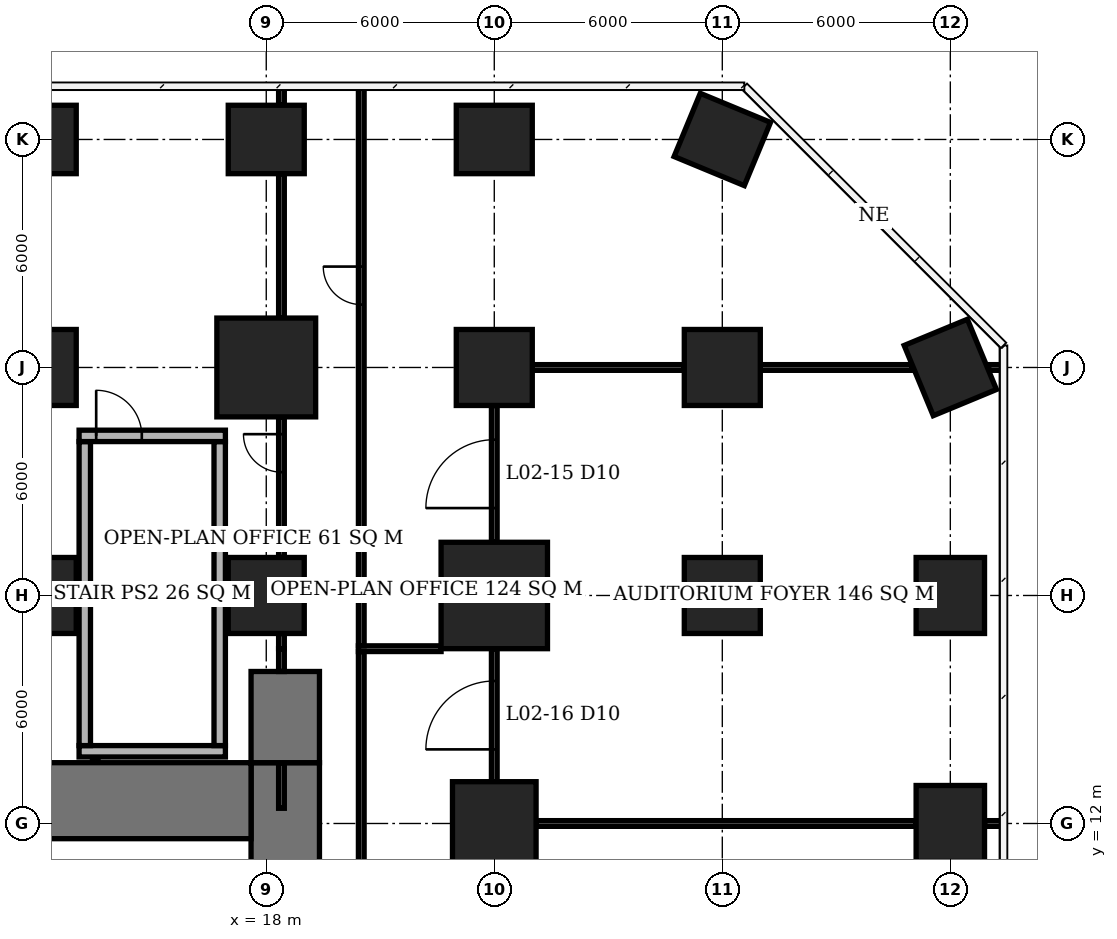
"""IFC4 building model, lengths in metres.
Left out: names, types, materials, properties, quantities, classifications, styles, units other than length and angle.
Written with IfcOpenShell. Run it as: python <this file> out.ifc"""

import sys

from ifc_helpers import new_model, si_unit, direction, frame, frame_2d, origin, origin_2d, place, context, subcontext, project, spatial, rectangle, extrude, element, fill, save


model = new_model("IFC4")
c1 = context("Model", 3, precision=1e-05, world=origin(), true_north=direction((0.0, 1.0)))
c2 = subcontext(c1, "Body", "Model", "MODEL_VIEW")
j1 = project(units=[si_unit("LENGTHUNIT", "METRE"), si_unit("PLANEANGLEUNIT", "RADIAN")], contexts=[c1])
p1 = place(None, origin())
s1 = spatial("IfcSite", under=j1, at=p1, CompositionType="ELEMENT")
p2 = place(p1, origin())
s2 = spatial("IfcBuilding", under=s1, at=p2, CompositionType="ELEMENT")
p3 = place(p2, frame((0.0, 0.0, 11.0)))
s3 = spatial("IfcBuildingStorey", under=s2, at=p3, CompositionType="ELEMENT", Elevation=11.0)
for number, where, z_axis, x_axis in (
    (1, (12.0, 18.0, 0.0), (0.0, 0.0, 1.0), (1.0, 0.0, 0.0)),
    (2, (12.0, 24.0, 0.0), (0.0, 0.0, 1.0), (1.0, 0.0, 0.0)),
):
    element("IfcColumn", number, at=place(p3, frame(where, z_axis=z_axis, x_axis=x_axis)), inside=s3, PredefinedType="COLUMN", context=c2, shape_type="SweptSolid", body=[
        extrude(rectangle(XDim=2.0, YDim=2.0, at=origin_2d()), origin(), (0.0, 0.0, 1.0), 7.2),
    ])
p4 = place(p3, frame((12.0, 30.0, 0.0), z_axis=(0.0, 0.0, 1.0), x_axis=(1.0, 0.0, 0.0)))
e3 = element("IfcColumn", 3, at=p4, inside=s3, PredefinedType="COLUMN", context=c2, shape_type="SweptSolid", body=[
    extrude(rectangle(XDim=2.0, YDim=1.8, at=origin_2d()), origin(), (0.0, 0.0, 1.0), 7.2),
])
p5 = place(p3, frame((18.0, 18.0, 0.0), z_axis=(0.0, 0.0, 1.0), x_axis=(1.0, 0.0, 0.0)))
e4 = element("IfcColumn", 4, at=p5, inside=s3, PredefinedType="COLUMN", context=c2, shape_type="SweptSolid", body=[
    extrude(rectangle(XDim=2.0, YDim=2.0, at=origin_2d()), origin(), (0.0, 0.0, 1.0), 7.2),
])
p6 = place(p3, frame((18.0, 24.0, 0.0), z_axis=(0.0, 0.0, 1.0), x_axis=(1.0, 0.0, 0.0)))
e5 = element("IfcColumn", 5, at=p6, inside=s3, PredefinedType="COLUMN", context=c2, shape_type="SweptSolid", body=[
    extrude(rectangle(XDim=2.6, YDim=2.6, at=origin_2d()), origin(), (0.0, 0.0, 1.0), 7.2),
])
p7 = place(p3, frame((18.0, 30.0, 0.0), z_axis=(0.0, 0.0, 1.0), x_axis=(1.0, 0.0, 0.0)))
e6 = element("IfcColumn", 6, at=p7, inside=s3, PredefinedType="COLUMN", context=c2, shape_type="SweptSolid", body=[
    extrude(rectangle(XDim=2.0, YDim=1.8, at=origin_2d()), origin(), (0.0, 0.0, 1.0), 7.2),
])
p8 = place(p3, frame((24.0, 12.0, 0.0), z_axis=(0.0, 0.0, 1.0), x_axis=(1.0, 0.0, 0.0)))
e7 = element("IfcColumn", 7, at=p8, inside=s3, PredefinedType="COLUMN", context=c2, shape_type="SweptSolid", body=[
    extrude(rectangle(XDim=2.2, YDim=2.2, at=origin_2d()), origin(), (0.0, 0.0, 1.0), 7.2),
])
p9 = place(p3, frame((24.0, 18.0, 0.0), z_axis=(0.0, 0.0, 1.0), x_axis=(1.0, 0.0, 0.0)))
e8 = element("IfcColumn", 8, at=p9, inside=s3, PredefinedType="COLUMN", context=c2, shape_type="SweptSolid", body=[
    extrude(rectangle(XDim=2.8, YDim=2.8, at=origin_2d()), origin(), (0.0, 0.0, 1.0), 7.2),
])
p10 = place(p3, frame((24.0, 24.0, 0.0), z_axis=(0.0, 0.0, 1.0), x_axis=(1.0, 0.0, 0.0)))
e9 = element("IfcColumn", 9, at=p10, inside=s3, PredefinedType="COLUMN", context=c2, shape_type="SweptSolid", body=[
    extrude(rectangle(XDim=2.0, YDim=2.0, at=origin_2d()), origin(), (0.0, 0.0, 1.0), 7.2),
])
p11 = place(p3, frame((24.0, 30.0, 0.0), z_axis=(0.0, 0.0, 1.0), x_axis=(1.0, 0.0, 0.0)))
e10 = element("IfcColumn", 10, at=p11, inside=s3, PredefinedType="COLUMN", context=c2, shape_type="SweptSolid", body=[
    extrude(rectangle(XDim=2.0, YDim=1.8, at=origin_2d()), origin(), (0.0, 0.0, 1.0), 7.2),
])
for number, where, z_axis, x_axis in (
    (11, (30.0, 18.0, 0.0), (0.0, 0.0, 1.0), (1.0, 0.0, 0.0)),
    (12, (30.0, 24.0, 0.0), (0.0, 0.0, 1.0), (1.0, 0.0, 0.0)),
):
    element("IfcColumn", number, at=place(p3, frame(where, z_axis=z_axis, x_axis=x_axis)), inside=s3, PredefinedType="COLUMN", context=c2, shape_type="SweptSolid", body=[
        extrude(rectangle(XDim=2.0, YDim=2.0, at=origin_2d()), origin(), (0.0, 0.0, 1.0), 7.2),
    ])
for number, where, z_axis, x_axis in (
    (13, (30.0, 30.0, 0.0), (0.0, 0.0, 1.0), (0.924, -0.383, 0.0)),
    (14, (36.0, 12.0, 0.0), (0.0, 0.0, 1.0), (0.0, 1.0, 0.0)),
    (15, (36.0, 18.0, 0.0), (0.0, 0.0, 1.0), (0.0, 1.0, 0.0)),
    (16, (36.0, 24.0, 0.0), (0.0, 0.0, 1.0), (0.383, -0.924, 0.0)),
):
    element("IfcColumn", number, at=place(p3, frame(where, z_axis=z_axis, x_axis=x_axis)), inside=s3, PredefinedType="COLUMN", context=c2, shape_type="SweptSolid", body=[
        extrude(rectangle(XDim=2.0, YDim=1.8, at=origin_2d()), origin(), (0.0, 0.0, 1.0), 7.2),
    ])
p12 = place(p3, frame((-5.6, 12.6, 0.0), z_axis=(0.0, 0.0, 1.0), x_axis=(1.0, 0.0, 0.0)))
e17 = element("IfcWall", 17, at=p12, inside=s3, PredefinedType="SHEAR", context=c2, shape_type="SweptSolid", body=[
    extrude(rectangle(XDim=23.2, YDim=2.0, at=frame_2d((11.6, 0.0))), origin(), (0.0, 0.0, 1.0), 7.2),
])
p13 = place(p3, frame((18.5, -7.6, 0.0), z_axis=(0.0, 0.0, 1.0), x_axis=(0.0, 1.0, 0.0)))
e18 = element("IfcWall", 18, at=p13, inside=s3, PredefinedType="SHEAR", context=c2, shape_type="SweptSolid", body=[
    extrude(rectangle(XDim=21.2, YDim=1.8, at=frame_2d((10.6, 0.0))), origin(), (0.0, 0.0, 1.0), 7.2),
])
p14 = place(p13, frame((9.2, 0.0, 0.0)))
e19 = element("IfcOpeningElement", 19, at=p14, cuts=e18, PredefinedType="OPENING", context=c2, shape_type="SweptSolid", body=[
    extrude(rectangle(XDim=1.8, YDim=2.4, at=frame_2d((0.9, 1.2))), frame((0.0, 0.91, 0.0), z_axis=(0.0, -1.0, 0.0), x_axis=(1.0, 0.0, 0.0)), (0.0, 0.0, 1.0), 1.82),
])
p15 = place(p3, frame((18.5, 13.6, 0.0), z_axis=(0.0, 0.0, 1.0), x_axis=(0.0, 1.0, 0.0)))
e20 = element("IfcWall", 20, at=p15, inside=s3, PredefinedType="SHEAR", context=c2, shape_type="SweptSolid", body=[
    extrude(rectangle(XDim=2.4, YDim=1.8, at=frame_2d((1.2, 0.0))), origin(), (0.0, 0.0, 1.0), 7.2),
])
p16 = place(p3, frame((13.075, 13.9, 0.0), z_axis=(0.0, 0.0, 1.0), x_axis=(1.0, 0.0, 0.0)))
e21 = element("IfcWall", 21, at=p16, inside=s3, PredefinedType="PARTITIONING", context=c2, shape_type="SweptSolid", body=[
    extrude(rectangle(XDim=3.85, YDim=0.3, at=frame_2d((1.925, 0.0))), origin(), (0.0, 0.0, 1.0), 6.95),
])
p17 = place(p3, frame((13.075, 22.2, 0.0), z_axis=(0.0, 0.0, 1.0), x_axis=(1.0, 0.0, 0.0)))
e22 = element("IfcWall", 22, at=p17, inside=s3, PredefinedType="PARTITIONING", context=c2, shape_type="SweptSolid", body=[
    extrude(rectangle(XDim=3.85, YDim=0.3, at=frame_2d((1.925, 0.0))), origin(), (0.0, 0.0, 1.0), 6.95),
])
p18 = place(p17, frame((0.45, 0.0, 0.0)))
e23 = element("IfcOpeningElement", 23, at=p18, cuts=e22, PredefinedType="OPENING", context=c2, shape_type="SweptSolid", body=[
    extrude(rectangle(XDim=1.2, YDim=2.1, at=frame_2d((0.6, 1.05))), frame((0.0, 0.16, 0.0), z_axis=(0.0, -1.0, 0.0), x_axis=(1.0, 0.0, 0.0)), (0.0, 0.0, 1.0), 0.32),
])
for number, where, z_axis, x_axis in (
    (24, (13.225, 14.05, 0.0), (0.0, 0.0, 1.0), (0.0, 1.0, 0.0)),
    (25, (16.775, 14.05, 0.0), (0.0, 0.0, 1.0), (0.0, 1.0, 0.0)),
):
    element("IfcWall", number, at=place(p3, frame(where, z_axis=z_axis, x_axis=x_axis)), inside=s3, PredefinedType="PARTITIONING", context=c2, shape_type="SweptSolid", body=[
        extrude(rectangle(XDim=8.0, YDim=0.3, at=frame_2d((4.0, 0.0))), origin(), (0.0, 0.0, 1.0), 6.95),
    ])
p19 = place(p3, frame((25.1, 12.0, 0.0), z_axis=(0.0, 0.0, 1.0), x_axis=(1.0, 0.0, 0.0)))
e26 = element("IfcWall", 26, at=p19, inside=s3, PredefinedType="PARTITIONING", context=c2, shape_type="SweptSolid", body=[
    extrude(rectangle(XDim=10.0, YDim=0.15, at=frame_2d((5.0, 0.0))), origin(), (0.0, 0.0, 1.0), 6.8),
])
p20 = place(p3, frame((36.9, 12.0, 0.0), z_axis=(0.0, 0.0, 1.0), x_axis=(1.0, 0.0, 0.0)))
e27 = element("IfcWall", 27, at=p20, inside=s3, PredefinedType="PARTITIONING", context=c2, shape_type="SweptSolid", body=[
    extrude(rectangle(XDim=0.475, YDim=0.15, at=frame_2d((0.238, 0.0))), origin(), (0.0, 0.0, 1.0), 6.8),
])
p21 = place(p3, frame((25.0, 24.0, 0.0), z_axis=(0.0, 0.0, 1.0), x_axis=(1.0, 0.0, 0.0)))
e28 = element("IfcWall", 28, at=p21, inside=s3, PredefinedType="PARTITIONING", context=c2, shape_type="SweptSolid", body=[
    extrude(rectangle(XDim=4.0, YDim=0.15, at=frame_2d((2.0, 0.0))), origin(), (0.0, 0.0, 1.0), 6.8),
])
p22 = place(p3, frame((31.0, 24.0, 0.0), z_axis=(0.0, 0.0, 1.0), x_axis=(1.0, 0.0, 0.0)))
e29 = element("IfcWall", 29, at=p22, inside=s3, PredefinedType="PARTITIONING", context=c2, shape_type="SweptSolid", body=[
    extrude(rectangle(XDim=3.995, YDim=0.15, at=frame_2d((1.998, 0.0))), origin(), (0.0, 0.0, 1.0), 6.8),
])
p23 = place(p3, frame((37.005, 24.0, 0.0), z_axis=(0.0, 0.0, 1.0), x_axis=(1.0, 0.0, 0.0)))
e30 = element("IfcWall", 30, at=p23, inside=s3, PredefinedType="PARTITIONING", context=c2, shape_type="SweptSolid", body=[
    extrude(rectangle(XDim=0.37, YDim=0.15, at=frame_2d((0.185, 0.0))), origin(), (0.0, 0.0, 1.0), 6.8),
])
p24 = place(p3, frame((24.0, 13.1, 0.0), z_axis=(0.0, 0.0, 1.0), x_axis=(0.0, 1.0, 0.0)))
e31 = element("IfcWall", 31, at=p24, inside=s3, PredefinedType="PARTITIONING", context=c2, shape_type="SweptSolid", body=[
    extrude(rectangle(XDim=3.5, YDim=0.15, at=frame_2d((1.75, 0.0))), origin(), (0.0, 0.0, 1.0), 6.8),
])
p25 = place(p24, frame((0.85, 0.0, 0.0)))
e32 = element("IfcOpeningElement", 32, at=p25, cuts=e31, PredefinedType="OPENING", context=c2, shape_type="SweptSolid", body=[
    extrude(rectangle(XDim=1.8, YDim=2.4, at=frame_2d((0.9, 1.2))), frame((0.0, 0.085, 0.0), z_axis=(0.0, -1.0, 0.0), x_axis=(1.0, 0.0, 0.0)), (0.0, 0.0, 1.0), 0.17),
])
p26 = place(p3, frame((24.0, 19.4, 0.0), z_axis=(0.0, 0.0, 1.0), x_axis=(0.0, 1.0, 0.0)))
e33 = element("IfcWall", 33, at=p26, inside=s3, PredefinedType="PARTITIONING", context=c2, shape_type="SweptSolid", body=[
    extrude(rectangle(XDim=3.6, YDim=0.15, at=frame_2d((1.8, 0.0))), origin(), (0.0, 0.0, 1.0), 6.8),
])
p27 = place(p26, frame((0.9, 0.0, 0.0)))
e34 = element("IfcOpeningElement", 34, at=p27, cuts=e33, PredefinedType="OPENING", context=c2, shape_type="SweptSolid", body=[
    extrude(rectangle(XDim=1.8, YDim=2.4, at=frame_2d((0.9, 1.2))), frame((0.0, 0.085, 0.0), z_axis=(0.0, -1.0, 0.0), x_axis=(1.0, 0.0, 0.0)), (0.0, 0.0, 1.0), 0.17),
])
p28 = place(p3, frame((13.5, 12.4, 0.0), z_axis=(0.0, 0.0, 1.0), x_axis=(0.0, 1.0, 0.0)))
e35 = element("IfcWall", 35, at=p28, inside=s3, PredefinedType="PARTITIONING", context=c2, shape_type="SweptSolid", body=[
    extrude(rectangle(XDim=1.35, YDim=0.15, at=frame_2d((0.675, 0.0))), origin(), (0.0, 0.0, 1.0), 6.95),
])
p29 = place(p3, frame((18.4, 12.4, 0.0), z_axis=(0.0, 0.0, 1.0), x_axis=(0.0, 1.0, 0.0)))
e36 = element("IfcWall", 36, at=p29, inside=s3, PredefinedType="PARTITIONING", context=c2, shape_type="SweptSolid", body=[
    extrude(rectangle(XDim=1.2, YDim=0.15, at=frame_2d((0.6, 0.0))), origin(), (0.0, 0.0, 1.0), 6.95),
])
p30 = place(p3, frame((18.4, 16.0, 0.0), z_axis=(0.0, 0.0, 1.0), x_axis=(0.0, 1.0, 0.0)))
e37 = element("IfcWall", 37, at=p30, inside=s3, PredefinedType="PARTITIONING", context=c2, shape_type="SweptSolid", body=[
    extrude(rectangle(XDim=0.6, YDim=0.15, at=frame_2d((0.3, 0.0))), origin(), (0.0, 0.0, 1.0), 6.95),
])
p31 = place(p3, frame((18.4, 16.6, 0.0), z_axis=(0.0, 0.0, 1.0), x_axis=(0.0, 1.0, 0.0)))
e38 = element("IfcWall", 38, at=p31, inside=s3, PredefinedType="PARTITIONING", context=c2, shape_type="SweptSolid", body=[
    extrude(rectangle(XDim=0.4, YDim=0.15, at=frame_2d((0.2, 0.0))), origin(), (0.0, 0.0, 1.0), 6.95),
])
p32 = place(p3, frame((18.4, 19.0, 0.0), z_axis=(0.0, 0.0, 1.0), x_axis=(0.0, 1.0, 0.0)))
e39 = element("IfcWall", 39, at=p32, inside=s3, PredefinedType="PARTITIONING", context=c2, shape_type="SweptSolid", body=[
    extrude(rectangle(XDim=3.7, YDim=0.15, at=frame_2d((1.85, 0.0))), origin(), (0.0, 0.0, 1.0), 6.95),
])
p33 = place(p32, frame((2.245, 0.0, 0.0)))
e40 = element("IfcOpeningElement", 40, at=p33, cuts=e39, PredefinedType="OPENING", context=c2, shape_type="SweptSolid", body=[
    extrude(rectangle(XDim=1.0, YDim=2.1, at=frame_2d((0.5, 1.05))), frame((0.0, 0.085, 0.0), z_axis=(0.0, -1.0, 0.0), x_axis=(1.0, 0.0, 0.0)), (0.0, 0.0, 1.0), 0.17),
])
p34 = place(p3, frame((18.4, 25.3, 0.0), z_axis=(0.0, 0.0, 1.0), x_axis=(0.0, 1.0, 0.0)))
e41 = element("IfcWall", 41, at=p34, inside=s3, PredefinedType="PARTITIONING", context=c2, shape_type="SweptSolid", body=[
    extrude(rectangle(XDim=3.8, YDim=0.15, at=frame_2d((1.9, 0.0))), origin(), (0.0, 0.0, 1.0), 6.95),
])
p35 = place(p3, frame((18.4, 30.9, 0.0), z_axis=(0.0, 0.0, 1.0), x_axis=(0.0, 1.0, 0.0)))
e42 = element("IfcWall", 42, at=p35, inside=s3, PredefinedType="PARTITIONING", context=c2, shape_type="SweptSolid", body=[
    extrude(rectangle(XDim=0.45, YDim=0.15, at=frame_2d((0.225, 0.0))), origin(), (0.0, 0.0, 1.0), 6.95),
])
p36 = place(p3, frame((20.5, 1.575, 0.0), z_axis=(0.0, 0.0, 1.0), x_axis=(0.0, 1.0, 0.0)))
e43 = element("IfcWall", 43, at=p36, inside=s3, PredefinedType="PARTITIONING", context=c2, shape_type="SweptSolid", body=[
    extrude(rectangle(XDim=14.95, YDim=0.15, at=frame_2d((7.475, 0.0))), origin(), (0.0, 0.0, 1.0), 6.95),
])
p37 = place(p36, frame((7.875, 0.0, 0.0)))
e44 = element("IfcOpeningElement", 44, at=p37, cuts=e43, PredefinedType="OPENING", context=c2, shape_type="SweptSolid", body=[
    extrude(rectangle(XDim=1.0, YDim=2.1, at=frame_2d((0.5, 1.05))), frame((0.0, 0.085, 0.0), z_axis=(0.0, -1.0, 0.0), x_axis=(1.0, 0.0, 0.0)), (0.0, 0.0, 1.0), 0.17),
])
p38 = place(p3, frame((20.5, 16.675, 0.0), z_axis=(0.0, 0.0, 1.0), x_axis=(0.0, 1.0, 0.0)))
e45 = element("IfcWall", 45, at=p38, inside=s3, PredefinedType="PARTITIONING", context=c2, shape_type="SweptSolid", body=[
    extrude(rectangle(XDim=14.7, YDim=0.15, at=frame_2d((7.35, 0.0))), origin(), (0.0, 0.0, 1.0), 6.95),
])
p39 = place(p38, frame((8.98, 0.0, 0.0)))
e46 = element("IfcOpeningElement", 46, at=p39, cuts=e45, PredefinedType="OPENING", context=c2, shape_type="SweptSolid", body=[
    extrude(rectangle(XDim=1.0, YDim=2.1, at=frame_2d((0.5, 1.05))), frame((0.0, 0.085, 0.0), z_axis=(0.0, -1.0, 0.0), x_axis=(1.0, 0.0, 0.0)), (0.0, 0.0, 1.0), 0.17),
])
p40 = place(p3, frame((20.425, 16.6, 0.0), z_axis=(0.0, 0.0, 1.0), x_axis=(1.0, 0.0, 0.0)))
e47 = element("IfcWall", 47, at=p40, inside=s3, PredefinedType="PARTITIONING", context=c2, shape_type="SweptSolid", body=[
    extrude(rectangle(XDim=2.175, YDim=0.15, at=frame_2d((1.087, 0.0))), origin(), (0.0, 0.0, 1.0), 6.95),
])
p41 = place(p18, origin())
e48 = element("IfcDoor", 48, at=p41, inside=s3, OperationType="SINGLE_SWING_LEFT", PredefinedType="DOOR", context=c2, shape_type="SweptSolid", body=[
    extrude(rectangle(XDim=1.2, YDim=2.1, at=frame_2d((0.6, 1.05))), frame((0.0, 0.025, 0.0), z_axis=(0.0, -1.0, 0.0), x_axis=(1.0, 0.0, 0.0)), (0.0, 0.0, 1.0), 0.05),
])
fill(e23, e48)
p42 = place(p27, origin())
e49 = element("IfcDoor", 49, at=p42, inside=s3, OperationType="DOUBLE_DOOR_SINGLE_SWING", PredefinedType="DOOR", context=c2, shape_type="SweptSolid", body=[
    extrude(rectangle(XDim=1.8, YDim=2.4, at=frame_2d((0.9, 1.2))), frame((0.0, 0.025, 0.0), z_axis=(0.0, -1.0, 0.0), x_axis=(1.0, 0.0, 0.0)), (0.0, 0.0, 1.0), 0.05),
])
fill(e34, e49)
p43 = place(p25, origin())
e50 = element("IfcDoor", 50, at=p43, inside=s3, OperationType="DOUBLE_DOOR_SINGLE_SWING", PredefinedType="DOOR", context=c2, shape_type="SweptSolid", body=[
    extrude(rectangle(XDim=1.8, YDim=2.4, at=frame_2d((0.9, 1.2))), frame((0.0, 0.025, 0.0), z_axis=(0.0, -1.0, 0.0), x_axis=(1.0, 0.0, 0.0)), (0.0, 0.0, 1.0), 0.05),
])
fill(e32, e50)
p44 = place(p33, origin())
e51 = element("IfcDoor", 51, at=p44, inside=s3, OperationType="SINGLE_SWING_RIGHT", PredefinedType="DOOR", context=c2, shape_type="SweptSolid", body=[
    extrude(rectangle(XDim=1.0, YDim=2.1, at=frame_2d((0.5, 1.05))), frame((0.0, 0.025, 0.0), z_axis=(0.0, -1.0, 0.0), x_axis=(1.0, 0.0, 0.0)), (0.0, 0.0, 1.0), 0.05),
])
fill(e40, e51)
p45 = place(p39, origin())
e52 = element("IfcDoor", 52, at=p45, inside=s3, OperationType="SINGLE_SWING_RIGHT", PredefinedType="DOOR", context=c2, shape_type="SweptSolid", body=[
    extrude(rectangle(XDim=1.0, YDim=2.1, at=frame_2d((0.5, 1.05))), frame((0.0, 0.025, 0.0), z_axis=(0.0, -1.0, 0.0), x_axis=(1.0, 0.0, 0.0)), (0.0, 0.0, 1.0), 0.05),
])
fill(e46, e52)
save(model, sys.argv[1])
